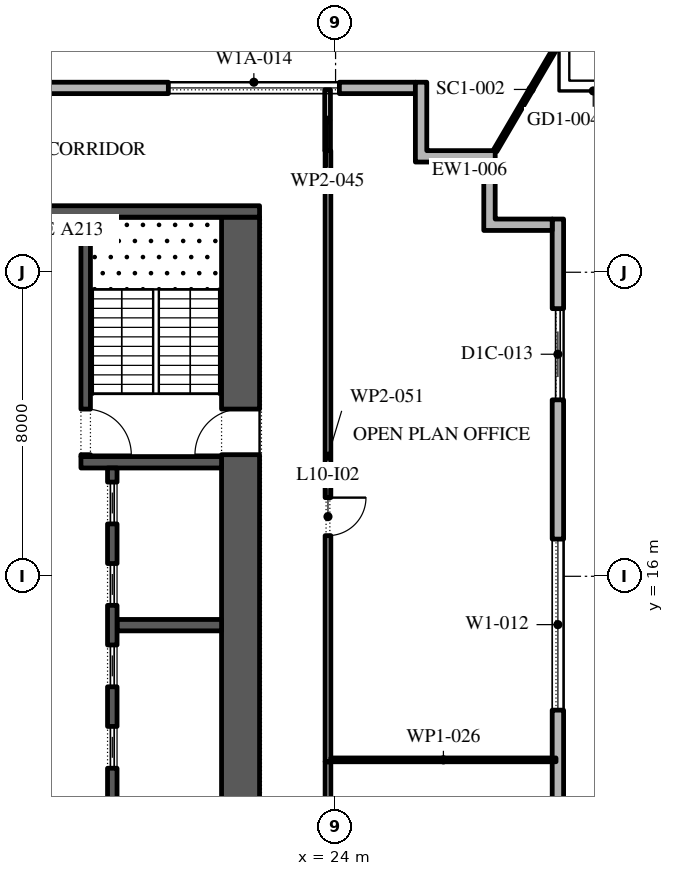
"""IFC4 building model, lengths in metres.
Left out: names, types, materials, properties, quantities, classifications, styles, units other than length and angle.
Written with IfcOpenShell. Run it as: python <this file> out.ifc"""

import sys

from ifc_helpers import new_model, si_unit, direction, frame, frame_2d, origin, place, context, subcontext, project, spatial, polyline, rectangle, outline, extrude, element, fill, save


model = new_model("IFC4")
c1 = context("Model", 3, precision=1e-05, world=origin(), true_north=direction((0.0, 1.0)))
c2 = subcontext(c1, "Body", "Model", "MODEL_VIEW")
j1 = project(units=[si_unit("LENGTHUNIT", "METRE"), si_unit("PLANEANGLEUNIT", "RADIAN")], contexts=[c1])
p1 = place(None, origin())
s1 = spatial("IfcSite", under=j1, at=p1, CompositionType="ELEMENT")
p2 = place(p1, origin())
s2 = spatial("IfcBuilding", under=s1, at=p2, CompositionType="ELEMENT")
p3 = place(p2, frame((0.0, 0.0, 52.2)))
s3 = spatial("IfcBuildingStorey", under=s2, at=p3, CompositionType="ELEMENT", Elevation=52.2)
p4 = place(p3, frame((29.85, -24.1, 0.0), z_axis=(0.0, 0.0, 1.0), x_axis=(0.0, 1.0, 0.0)))
e1 = element("IfcWall", 1, at=p4, inside=s3, PredefinedType="STANDARD", context=c2, shape_type="SweptSolid", body=[
    extrude(rectangle(XDim=49.5, YDim=0.3, at=frame_2d((24.75, 0.0))), origin(), (0.0, 0.0, 1.0), 4.0),
])
p5 = place(p4, frame((1.157, 0.0, 0.45)))
e2 = element("IfcOpeningElement", 2, at=p5, cuts=e1, PredefinedType="OPENING", context=c2, shape_type="SweptSolid", body=[
    extrude(rectangle(XDim=4.5, YDim=3.05, at=frame_2d((2.25, 1.525))), frame((0.0, 0.16, 0.0), z_axis=(0.0, -1.0, 0.0), x_axis=(1.0, 0.0, 0.0)), (0.0, 0.0, 1.0), 0.32),
])
p6 = place(p4, frame((8.121, 0.0, 0.45)))
e3 = element("IfcOpeningElement", 3, at=p6, cuts=e1, PredefinedType="OPENING", context=c2, shape_type="SweptSolid", body=[
    extrude(rectangle(XDim=4.5, YDim=2.825, at=frame_2d((2.25, 1.413))), frame((0.0, 0.16, 0.0), z_axis=(0.0, -1.0, 0.0), x_axis=(1.0, 0.0, 0.0)), (0.0, 0.0, 1.0), 0.32),
])
p7 = place(p4, frame((16.286, 0.0, 0.0)))
e4 = element("IfcOpeningElement", 4, at=p7, cuts=e1, PredefinedType="OPENING", context=c2, shape_type="SweptSolid", body=[
    extrude(rectangle(XDim=2.4, YDim=3.325, at=frame_2d((1.2, 1.663))), frame((0.0, 0.16, 0.0), z_axis=(0.0, -1.0, 0.0), x_axis=(1.0, 0.0, 0.0)), (0.0, 0.0, 1.0), 0.32),
])
p8 = place(p4, frame((22.35, 0.0, 0.45)))
e5 = element("IfcOpeningElement", 5, at=p8, cuts=e1, PredefinedType="OPENING", context=c2, shape_type="SweptSolid", body=[
    extrude(rectangle(XDim=4.5, YDim=2.875, at=frame_2d((2.25, 1.438))), frame((0.0, 0.16, 0.0), z_axis=(0.0, -1.0, 0.0), x_axis=(1.0, 0.0, 0.0)), (0.0, 0.0, 1.0), 0.32),
])
p9 = place(p4, frame((29.464, 0.0, 0.45)))
e6 = element("IfcOpeningElement", 6, at=p9, cuts=e1, PredefinedType="OPENING", context=c2, shape_type="SweptSolid", body=[
    extrude(rectangle(XDim=4.5, YDim=2.875, at=frame_2d((2.25, 1.438))), frame((0.0, 0.16, 0.0), z_axis=(0.0, -1.0, 0.0), x_axis=(1.0, 0.0, 0.0)), (0.0, 0.0, 1.0), 0.32),
])
p10 = place(p4, frame((36.579, 0.0, 0.45)))
e7 = element("IfcOpeningElement", 7, at=p10, cuts=e1, PredefinedType="OPENING", context=c2, shape_type="SweptSolid", body=[
    extrude(rectangle(XDim=4.5, YDim=3.05, at=frame_2d((2.25, 1.525))), frame((0.0, 0.16, 0.0), z_axis=(0.0, -1.0, 0.0), x_axis=(1.0, 0.0, 0.0)), (0.0, 0.0, 1.0), 0.32),
])
p11 = place(p4, frame((44.743, 0.0, 0.0)))
e8 = element("IfcOpeningElement", 8, at=p11, cuts=e1, PredefinedType="OPENING", context=c2, shape_type="SweptSolid", body=[
    extrude(rectangle(XDim=2.4, YDim=3.325, at=frame_2d((1.2, 1.663))), frame((0.0, 0.16, 0.0), z_axis=(0.0, -1.0, 0.0), x_axis=(1.0, 0.0, 0.0)), (0.0, 0.0, 1.0), 0.32),
])
p12 = place(p3, frame((26.1, 28.85, 0.0), z_axis=(0.0, 0.0, 1.0), x_axis=(-1.0, 0.0, 0.0)))
e9 = element("IfcWall", 9, at=p12, inside=s3, PredefinedType="STANDARD", context=c2, shape_type="SweptSolid", body=[
    extrude(rectangle(XDim=52.5, YDim=0.3, at=frame_2d((26.25, 0.0))), origin(), (0.0, 0.0, 1.0), 4.0),
])
p13 = place(p12, frame((2.0, 0.0, 0.45)))
e10 = element("IfcOpeningElement", 10, at=p13, cuts=e9, PredefinedType="OPENING", context=c2, shape_type="SweptSolid", body=[
    extrude(rectangle(XDim=4.5, YDim=3.0, at=frame_2d((2.25, 1.5))), frame((0.0, 0.16, 0.0), z_axis=(0.0, -1.0, 0.0), x_axis=(1.0, 0.0, 0.0)), (0.0, 0.0, 1.0), 0.32),
])
p14 = place(p12, frame((10.65, 0.0, 0.45)))
e11 = element("IfcOpeningElement", 11, at=p14, cuts=e9, PredefinedType="OPENING", context=c2, shape_type="SweptSolid", body=[
    extrude(rectangle(XDim=4.5, YDim=3.0, at=frame_2d((2.25, 1.5))), frame((0.0, 0.16, 0.0), z_axis=(0.0, -1.0, 0.0), x_axis=(1.0, 0.0, 0.0)), (0.0, 0.0, 1.0), 0.32),
])
p15 = place(p12, frame((20.5, 0.0, 0.0)))
e12 = element("IfcOpeningElement", 12, at=p15, cuts=e9, PredefinedType="OPENING", context=c2, shape_type="SweptSolid", body=[
    extrude(rectangle(XDim=2.4, YDim=3.5, at=frame_2d((1.2, 1.75))), frame((0.0, 0.16, 0.0), z_axis=(0.0, -1.0, 0.0), x_axis=(1.0, 0.0, 0.0)), (0.0, 0.0, 1.0), 0.32),
])
p16 = place(p12, frame((28.25, 0.0, 0.45)))
e13 = element("IfcOpeningElement", 13, at=p16, cuts=e9, PredefinedType="OPENING", context=c2, shape_type="SweptSolid", body=[
    extrude(rectangle(XDim=4.5, YDim=3.0, at=frame_2d((2.25, 1.5))), frame((0.0, 0.16, 0.0), z_axis=(0.0, -1.0, 0.0), x_axis=(1.0, 0.0, 0.0)), (0.0, 0.0, 1.0), 0.32),
])
p17 = place(p12, frame((37.05, 0.0, 0.45)))
e14 = element("IfcOpeningElement", 14, at=p17, cuts=e9, PredefinedType="OPENING", context=c2, shape_type="SweptSolid", body=[
    extrude(rectangle(XDim=4.5, YDim=3.0, at=frame_2d((2.25, 1.5))), frame((0.0, 0.16, 0.0), z_axis=(0.0, -1.0, 0.0), x_axis=(1.0, 0.0, 0.0)), (0.0, 0.0, 1.0), 0.32),
])
p18 = place(p12, frame((45.85, 0.0, 0.45)))
e15 = element("IfcOpeningElement", 15, at=p18, cuts=e9, PredefinedType="OPENING", context=c2, shape_type="SweptSolid", body=[
    extrude(rectangle(XDim=4.5, YDim=3.0, at=frame_2d((2.25, 1.5))), frame((0.0, 0.16, 0.0), z_axis=(0.0, -1.0, 0.0), x_axis=(1.0, 0.0, 0.0)), (0.0, 0.0, 1.0), 0.32),
])
p19 = place(p3, origin())
e16 = element("IfcWall", 16, at=p19, inside=s3, PredefinedType="STANDARD", context=c2, shape_type="SweptSolid", body=[
    extrude(outline(polyline([(27.9, 26.9), (26.1, 26.9), (26.1, 29.0), (26.4, 29.0), (26.4, 27.2), (28.2, 27.2), (28.2, 25.4), (29.7, 25.4), (29.7, 25.1), (27.9, 25.1), (27.9, 26.9)])), origin(), (0.0, 0.0, 1.0), 4.0),
])
p20 = place(p3, frame((28.2, 27.2, -0.05), z_axis=(0.0, 0.0, 1.0), x_axis=(0.50603666658, 0.862511966338, 0.0)))
e17 = element("IfcWall", 17, at=p20, inside=s3, PredefinedType="STANDARD", context=c2, shape_type="SweptSolid", body=[
    extrude(rectangle(XDim=3.733, YDim=0.1, at=frame_2d((1.867, 0.0))), origin(), (0.0, 0.0, 1.0), 4.05),
])
p21 = place(p3, frame((21.5, -2.45, 0.0), z_axis=(0.0, 0.0, 1.0), x_axis=(0.0, 1.0, 0.0)))
e18 = element("IfcWall", 18, at=p21, inside=s3, PredefinedType="SHEAR", context=c2, shape_type="SweptSolid", body=[
    extrude(rectangle(XDim=27.9, YDim=1.0, at=frame_2d((13.95, 0.0))), origin(), (0.0, 0.0, 1.0), 4.0),
])
p22 = place(p21, frame((5.05, 0.0, 0.0)))
e19 = element("IfcOpeningElement", 19, at=p22, cuts=e18, PredefinedType="OPENING", context=c2, shape_type="SweptSolid", body=[
    extrude(rectangle(XDim=1.2, YDim=2.1, at=frame_2d((0.6, 1.05))), frame((0.0, 0.51, 0.0), z_axis=(0.0, -1.0, 0.0), x_axis=(1.0, 0.0, 0.0)), (0.0, 0.0, 1.0), 1.02),
])
p23 = place(p21, frame((21.65, 0.0, 0.0)))
e20 = element("IfcOpeningElement", 20, at=p23, cuts=e18, PredefinedType="OPENING", context=c2, shape_type="SweptSolid", body=[
    extrude(rectangle(XDim=1.2, YDim=2.1, at=frame_2d((0.6, 1.05))), frame((0.0, 0.51, 0.0), z_axis=(0.0, -1.0, 0.0), x_axis=(1.0, 0.0, 0.0)), (0.0, 0.0, 1.0), 1.02),
])
p24 = place(p3, frame((10.0, 25.6, 0.0), z_axis=(0.0, 0.0, 1.0), x_axis=(1.0, 0.0, 0.0)))
e21 = element("IfcWall", 21, at=p24, inside=s3, PredefinedType="SHEAR", context=c2, shape_type="SweptSolid", body=[
    extrude(rectangle(XDim=12.0, YDim=0.3, at=frame_2d((6.0, 0.0))), origin(), (0.0, 0.0, 1.0), 4.0),
])
p25 = place(p3, frame((17.3, 19.0, 0.0), z_axis=(0.0, 0.0, 1.0), x_axis=(1.0, 0.0, 0.0)))
e22 = element("IfcWall", 22, at=p25, inside=s3, PredefinedType="SHEAR", context=c2, shape_type="SweptSolid", body=[
    extrude(rectangle(XDim=3.7, YDim=0.3, at=frame_2d((1.85, 0.0))), origin(), (0.0, 0.0, 1.0), 4.0),
])
p26 = place(p3, frame((17.425, 19.15, 0.0), z_axis=(0.0, 0.0, 1.0), x_axis=(0.0, 1.0, 0.0)))
e23 = element("IfcWall", 23, at=p26, inside=s3, PredefinedType="SHEAR", context=c2, shape_type="SweptSolid", body=[
    extrude(rectangle(XDim=6.3, YDim=0.25, at=frame_2d((3.15, 0.0))), origin(), (0.0, 0.0, 1.0), 4.0),
])
p27 = place(p26, frame((0.05, 0.0, 0.0)))
e24 = element("IfcOpeningElement", 24, at=p27, cuts=e23, PredefinedType="OPENING", context=c2, shape_type="SweptSolid", body=[
    extrude(rectangle(XDim=1.2, YDim=2.1, at=frame_2d((0.6, 1.05))), frame((0.0, 0.135, 0.0), z_axis=(0.0, -1.0, 0.0), x_axis=(1.0, 0.0, 0.0)), (0.0, 0.0, 1.0), 0.27),
])
p28 = place(p3, frame((18.25, 14.714, 0.0), z_axis=(0.0, 0.0, 1.0), x_axis=(1.0, 0.0, 0.0)))
e25 = element("IfcWall", 25, at=p28, inside=s3, PredefinedType="SHEAR", context=c2, shape_type="SweptSolid", body=[
    extrude(rectangle(XDim=2.75, YDim=0.3, at=frame_2d((1.375, 0.0))), origin(), (0.0, 0.0, 1.0), 4.0),
])
p29 = place(p3, frame((18.125, 4.15, 0.0), z_axis=(0.0, 0.0, 1.0), x_axis=(0.0, 1.0, 0.0)))
e26 = element("IfcWall", 26, at=p29, inside=s3, PredefinedType="SHEAR", context=c2, shape_type="SweptSolid", body=[
    extrude(rectangle(XDim=14.7, YDim=0.25, at=frame_2d((7.35, 0.0))), origin(), (0.0, 0.0, 1.0), 4.0),
])
p30 = place(p29, frame((0.371, 0.0, 0.0)))
e27 = element("IfcOpeningElement", 27, at=p30, cuts=e26, PredefinedType="OPENING", context=c2, shape_type="SweptSolid", body=[
    extrude(rectangle(XDim=1.1, YDim=2.1, at=frame_2d((0.55, 1.05))), frame((0.0, 0.135, 0.0), z_axis=(0.0, -1.0, 0.0), x_axis=(1.0, 0.0, 0.0)), (0.0, 0.0, 1.0), 0.27),
])
p31 = place(p29, frame((2.514, 0.0, 0.0)))
e28 = element("IfcOpeningElement", 28, at=p31, cuts=e26, PredefinedType="OPENING", context=c2, shape_type="SweptSolid", body=[
    extrude(rectangle(XDim=1.1, YDim=2.1, at=frame_2d((0.55, 1.05))), frame((0.0, 0.135, 0.0), z_axis=(0.0, -1.0, 0.0), x_axis=(1.0, 0.0, 0.0)), (0.0, 0.0, 1.0), 0.27),
])
p32 = place(p29, frame((4.657, 0.0, 0.0)))
e29 = element("IfcOpeningElement", 29, at=p32, cuts=e26, PredefinedType="OPENING", context=c2, shape_type="SweptSolid", body=[
    extrude(rectangle(XDim=1.1, YDim=2.1, at=frame_2d((0.55, 1.05))), frame((0.0, 0.135, 0.0), z_axis=(0.0, -1.0, 0.0), x_axis=(1.0, 0.0, 0.0)), (0.0, 0.0, 1.0), 0.27),
])
p33 = place(p29, frame((6.8, 0.0, 0.0)))
e30 = element("IfcOpeningElement", 30, at=p33, cuts=e26, PredefinedType="OPENING", context=c2, shape_type="SweptSolid", body=[
    extrude(rectangle(XDim=1.1, YDim=2.1, at=frame_2d((0.55, 1.05))), frame((0.0, 0.135, 0.0), z_axis=(0.0, -1.0, 0.0), x_axis=(1.0, 0.0, 0.0)), (0.0, 0.0, 1.0), 0.27),
])
p34 = place(p29, frame((8.943, 0.0, 0.0)))
e31 = element("IfcOpeningElement", 31, at=p34, cuts=e26, PredefinedType="OPENING", context=c2, shape_type="SweptSolid", body=[
    extrude(rectangle(XDim=1.1, YDim=2.1, at=frame_2d((0.55, 1.05))), frame((0.0, 0.135, 0.0), z_axis=(0.0, -1.0, 0.0), x_axis=(1.0, 0.0, 0.0)), (0.0, 0.0, 1.0), 0.27),
])
p35 = place(p29, frame((11.086, 0.0, 0.0)))
e32 = element("IfcOpeningElement", 32, at=p35, cuts=e26, PredefinedType="OPENING", context=c2, shape_type="SweptSolid", body=[
    extrude(rectangle(XDim=1.1, YDim=2.1, at=frame_2d((0.55, 1.05))), frame((0.0, 0.135, 0.0), z_axis=(0.0, -1.0, 0.0), x_axis=(1.0, 0.0, 0.0)), (0.0, 0.0, 1.0), 0.27),
])
p36 = place(p29, frame((13.229, 0.0, 0.0)))
e33 = element("IfcOpeningElement", 33, at=p36, cuts=e26, PredefinedType="OPENING", context=c2, shape_type="SweptSolid", body=[
    extrude(rectangle(XDim=1.1, YDim=2.1, at=frame_2d((0.55, 1.05))), frame((0.0, 0.135, 0.0), z_axis=(0.0, -1.0, 0.0), x_axis=(1.0, 0.0, 0.0)), (0.0, 0.0, 1.0), 0.27),
])
p37 = place(p3, frame((23.79, 28.8, 0.0), z_axis=(0.0, 0.0, 1.0), x_axis=(0.0, -1.0, 0.0)))
e34 = element("IfcWall", 34, at=p37, inside=s3, PredefinedType="PARTITIONING", context=c2, shape_type="SweptSolid", body=[
    extrude(rectangle(XDim=1.6, YDim=0.15, at=frame_2d((0.8, 0.0))), origin(), (0.0, 0.0, 1.0), 4.0),
])
p38 = place(p3, frame((23.8, 11.12, 0.0), z_axis=(0.0, 0.0, 1.0), x_axis=(0.0, -1.0, 0.0)))
e35 = element("IfcWall", 35, at=p38, inside=s3, PredefinedType="PARTITIONING", context=c2, shape_type="SweptSolid", body=[
    extrude(rectangle(XDim=7.01, YDim=0.15, at=frame_2d((3.505, 0.0))), origin(), (0.0, 0.0, 1.0), 4.0),
])
p39 = place(p38, frame((2.41, 0.0, 0.0)))
e36 = element("IfcOpeningElement", 36, at=p39, cuts=e35, PredefinedType="OPENING", context=c2, shape_type="SweptSolid", body=[
    extrude(rectangle(XDim=1.0, YDim=2.1, at=frame_2d((0.5, 1.05))), frame((0.0, 0.085, 0.0), z_axis=(0.0, -1.0, 0.0), x_axis=(1.0, 0.0, 0.0)), (0.0, 0.0, 1.0), 0.17),
])
p40 = place(p3, frame((23.8, 27.2, 0.0), z_axis=(0.0, 0.0, 1.0), x_axis=(0.0, -1.0, 0.0)))
e37 = element("IfcWall", 37, at=p40, inside=s3, PredefinedType="PARTITIONING", context=c2, shape_type="SweptSolid", body=[
    extrude(rectangle(XDim=16.08, YDim=0.15, at=frame_2d((8.04, 0.0))), origin(), (0.0, 0.0, 1.0), 4.0),
])
p41 = place(p40, frame((9.13, 0.0, 0.0)))
e38 = element("IfcOpeningElement", 38, at=p41, cuts=e37, PredefinedType="OPENING", context=c2, shape_type="SweptSolid", body=[
    extrude(rectangle(XDim=1.0, YDim=2.1, at=frame_2d((0.5, 1.05))), frame((0.0, 0.085, 0.0), z_axis=(0.0, -1.0, 0.0), x_axis=(1.0, 0.0, 0.0)), (0.0, 0.0, 1.0), 0.17),
])
p42 = place(p3, frame((29.8, 11.17, 0.0), z_axis=(0.0, 0.0, 1.0), x_axis=(-1.0, 0.0, 0.0)))
e39 = element("IfcWall", 39, at=p42, inside=s3, PredefinedType="PARTITIONING", context=c2, shape_type="SweptSolid", body=[
    extrude(rectangle(XDim=5.925, YDim=0.1, at=frame_2d((2.962, 0.0))), origin(), (0.0, 0.0, 1.0), 4.0),
])
p43 = place(p10, origin())
e40 = element("IfcWindow", 40, at=p43, inside=s3, PartitioningType="DOUBLE_PANEL_VERTICAL", PredefinedType="WINDOW", context=c2, shape_type="SweptSolid", body=[
    extrude(rectangle(XDim=4.5, YDim=3.05, at=frame_2d((2.25, 1.525))), frame((0.0, 0.03, 0.0), z_axis=(0.0, -1.0, 0.0), x_axis=(1.0, 0.0, 0.0)), (0.0, 0.0, 1.0), 0.06),
])
fill(e7, e40)
p44 = place(p11, origin())
e41 = element("IfcDoor", 41, at=p44, inside=s3, OperationType="DOUBLE_DOOR_SLIDING", PredefinedType="DOOR", context=c2, shape_type="SweptSolid", body=[
    extrude(rectangle(XDim=2.4, YDim=3.325, at=frame_2d((1.2, 1.663))), frame((0.0, 0.025, 0.0), z_axis=(0.0, -1.0, 0.0), x_axis=(1.0, 0.0, 0.0)), (0.0, 0.0, 1.0), 0.05),
])
fill(e8, e41)
p45 = place(p13, origin())
e42 = element("IfcWindow", 42, at=p45, inside=s3, PartitioningType="DOUBLE_PANEL_VERTICAL", PredefinedType="WINDOW", context=c2, shape_type="SweptSolid", body=[
    extrude(rectangle(XDim=4.5, YDim=3.0, at=frame_2d((2.25, 1.5))), frame((0.0, 0.03, 0.0), z_axis=(0.0, -1.0, 0.0), x_axis=(1.0, 0.0, 0.0)), (0.0, 0.0, 1.0), 0.06),
])
fill(e10, e42)
p46 = place(p33, origin())
e43 = element("IfcDoor", 43, at=p46, inside=s3, OperationType="SLIDING_TO_LEFT", PredefinedType="DOOR", context=c2, shape_type="SweptSolid", body=[
    extrude(rectangle(XDim=1.1, YDim=2.1, at=frame_2d((0.55, 1.05))), frame((0.0, 0.025, 0.0), z_axis=(0.0, -1.0, 0.0), x_axis=(1.0, 0.0, 0.0)), (0.0, 0.0, 1.0), 0.05),
])
fill(e30, e43)
p47 = place(p34, origin())
e44 = element("IfcDoor", 44, at=p47, inside=s3, OperationType="SLIDING_TO_LEFT", PredefinedType="DOOR", context=c2, shape_type="SweptSolid", body=[
    extrude(rectangle(XDim=1.1, YDim=2.1, at=frame_2d((0.55, 1.05))), frame((0.0, 0.025, 0.0), z_axis=(0.0, -1.0, 0.0), x_axis=(1.0, 0.0, 0.0)), (0.0, 0.0, 1.0), 0.05),
])
fill(e31, e44)
p48 = place(p35, origin())
e45 = element("IfcDoor", 45, at=p48, inside=s3, OperationType="SLIDING_TO_LEFT", PredefinedType="DOOR", context=c2, shape_type="SweptSolid", body=[
    extrude(rectangle(XDim=1.1, YDim=2.1, at=frame_2d((0.55, 1.05))), frame((0.0, 0.025, 0.0), z_axis=(0.0, -1.0, 0.0), x_axis=(1.0, 0.0, 0.0)), (0.0, 0.0, 1.0), 0.05),
])
fill(e32, e45)
p49 = place(p36, origin())
e46 = element("IfcDoor", 46, at=p49, inside=s3, OperationType="SLIDING_TO_LEFT", PredefinedType="DOOR", context=c2, shape_type="SweptSolid", body=[
    extrude(rectangle(XDim=1.1, YDim=2.1, at=frame_2d((0.55, 1.05))), frame((0.0, 0.025, 0.0), z_axis=(0.0, -1.0, 0.0), x_axis=(1.0, 0.0, 0.0)), (0.0, 0.0, 1.0), 0.05),
])
fill(e33, e46)
p50 = place(p27, frame((1.2, 0.0, 0.0), z_axis=(0.0, 0.0, 1.0), x_axis=(-1.0, 0.0, 0.0)))
e47 = element("IfcDoor", 47, at=p50, inside=s3, OperationType="SINGLE_SWING_LEFT", PredefinedType="DOOR", context=c2, shape_type="SweptSolid", body=[
    extrude(rectangle(XDim=1.2, YDim=2.1, at=frame_2d((0.6, 1.05))), frame((0.0, 0.025, 0.0), z_axis=(0.0, -1.0, 0.0), x_axis=(1.0, 0.0, 0.0)), (0.0, 0.0, 1.0), 0.05),
])
fill(e24, e47)
p51 = place(p23, origin())
e48 = element("IfcDoor", 48, at=p51, inside=s3, OperationType="SINGLE_SWING_RIGHT", PredefinedType="DOOR", context=c2, shape_type="SweptSolid", body=[
    extrude(rectangle(XDim=1.2, YDim=2.1, at=frame_2d((0.6, 1.05))), frame((0.0, 0.025, 0.0), z_axis=(0.0, -1.0, 0.0), x_axis=(1.0, 0.0, 0.0)), (0.0, 0.0, 1.0), 0.05),
])
fill(e20, e48)
p52 = place(p41, origin())
e49 = element("IfcDoor", 49, at=p52, inside=s3, OperationType="SINGLE_SWING_RIGHT", PredefinedType="DOOR", context=c2, shape_type="SweptSolid", body=[
    extrude(rectangle(XDim=1.0, YDim=2.1, at=frame_2d((0.5, 1.05))), frame((0.0, 0.025, 0.0), z_axis=(0.0, -1.0, 0.0), x_axis=(1.0, 0.0, 0.0)), (0.0, 0.0, 1.0), 0.05),
])
fill(e38, e49)
save(model, sys.argv[1])
